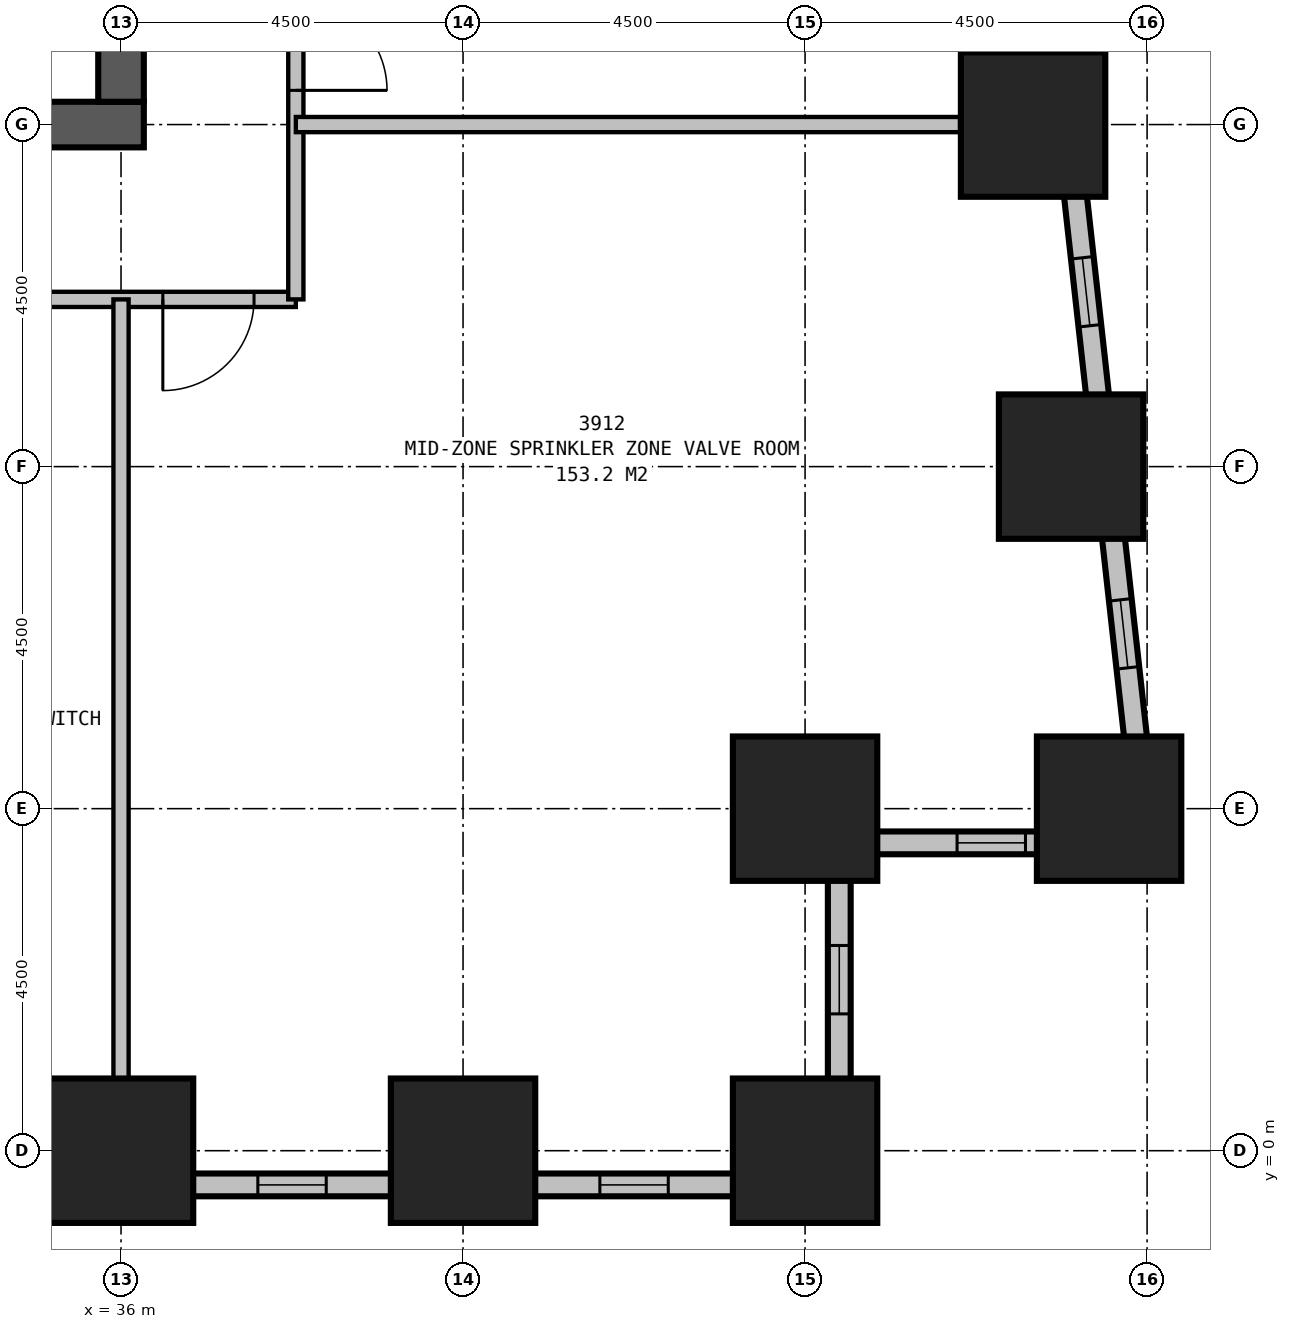
"""IFC4 building model, lengths in metres.
Left out: names, types, materials, properties, quantities, classifications, styles, units other than length and angle.
Written with IfcOpenShell. Run it as: python <this file> out.ifc"""

import sys

from ifc_helpers import new_model, si_unit, direction, frame, frame_2d, origin, origin_2d, place, context, subcontext, project, spatial, rectangle, extrude, element, fill, save


model = new_model("IFC4")
c1 = context("Model", 3, precision=1e-05, world=origin(), true_north=direction((0.0, 1.0)))
c2 = subcontext(c1, "Body", "Model", "MODEL_VIEW")
j1 = project(units=[si_unit("LENGTHUNIT", "METRE"), si_unit("PLANEANGLEUNIT", "RADIAN")], contexts=[c1])
p1 = place(None, origin())
s1 = spatial("IfcSite", under=j1, at=p1, CompositionType="ELEMENT")
p2 = place(p1, origin())
s2 = spatial("IfcBuilding", under=s1, at=p2, CompositionType="ELEMENT")
p3 = place(p2, frame((0.0, 0.0, 151.9)))
s3 = spatial("IfcBuildingStorey", under=s2, at=p3, CompositionType="ELEMENT", Elevation=151.9)
for number, where, z_axis, x_axis in (
    (1, (36.0, 0.0, 0.0), (0.0, 0.0, 1.0), (1.0, 0.0, 0.0)),
    (2, (40.5, 0.0, 0.0), (0.0, 0.0, 1.0), (1.0, 0.0, 0.0)),
    (3, (45.0, 0.0, 0.0), (0.0, 0.0, 1.0), (1.0, 0.0, 0.0)),
    (4, (45.0, 4.5, 0.0), (0.0, 0.0, 1.0), (1.0, 0.0, 0.0)),
    (5, (49.0, 4.5, 0.0), (0.0, 0.0, 1.0), (1.0, 0.0, 0.0)),
    (6, (48.5, 9.0, 0.0), (0.0, 0.0, 1.0), (1.0, 0.0, 0.0)),
    (7, (48.0, 13.5, 0.0), (0.0, 0.0, 1.0), (1.0, 0.0, 0.0)),
):
    element("IfcColumn", number, at=place(p3, frame(where, z_axis=z_axis, x_axis=x_axis)), inside=s3, PredefinedType="COLUMN", context=c2, shape_type="SweptSolid", body=[
        extrude(rectangle(XDim=1.9, YDim=1.9, at=origin_2d()), origin(), (0.0, 0.0, 1.0), 6.0),
    ])
p4 = place(p3, frame((13.2, 13.5, 0.0), z_axis=(0.0, 0.0, 1.0), x_axis=(1.0, 0.0, 0.0)))
e8 = element("IfcWall", 8, at=p4, inside=s3, PredefinedType="SHEAR", context=c2, shape_type="SweptSolid", body=[
    extrude(rectangle(XDim=23.1, YDim=0.6, at=frame_2d((11.55, 0.0))), origin(), (0.0, 0.0, 1.0), 6.0),
])
p5 = place(p3, frame((36.0, 13.8, 0.0), z_axis=(0.0, 0.0, 1.0), x_axis=(0.0, 1.0, 0.0)))
e9 = element("IfcWall", 9, at=p5, inside=s3, PredefinedType="SHEAR", context=c2, shape_type="SweptSolid", body=[
    extrude(rectangle(XDim=2.7, YDim=0.6, at=frame_2d((1.35, 0.0))), origin(), (0.0, 0.0, 1.0), 6.0),
])
p6 = place(p3, frame((3.9, -0.45, 0.0), z_axis=(0.0, 0.0, 1.0), x_axis=(1.0, 0.0, 0.0)))
e10 = element("IfcWall", 10, at=p6, inside=s3, PredefinedType="STANDARD", context=c2, shape_type="SweptSolid", body=[
    extrude(rectangle(XDim=41.7, YDim=0.3, at=frame_2d((20.85, 0.0))), origin(), (0.0, 0.0, 1.0), 3.35),
])
p7 = place(p6, frame((2.4, 0.0, 0.5)))
e11 = element("IfcOpeningElement", 11, at=p7, cuts=e10, PredefinedType="OPENING", context=c2, shape_type="SweptSolid", body=[
    extrude(rectangle(XDim=0.9, YDim=1.2, at=frame_2d((0.45, 0.6))), frame((0.0, 0.16, 0.0), z_axis=(0.0, -1.0, 0.0), x_axis=(1.0, 0.0, 0.0)), (0.0, 0.0, 1.0), 0.32),
])
p8 = place(p6, frame((6.9, 0.0, 0.5)))
e12 = element("IfcOpeningElement", 12, at=p8, cuts=e10, PredefinedType="OPENING", context=c2, shape_type="SweptSolid", body=[
    extrude(rectangle(XDim=0.9, YDim=1.2, at=frame_2d((0.45, 0.6))), frame((0.0, 0.16, 0.0), z_axis=(0.0, -1.0, 0.0), x_axis=(1.0, 0.0, 0.0)), (0.0, 0.0, 1.0), 0.32),
])
p9 = place(p6, frame((11.4, 0.0, 0.5)))
e13 = element("IfcOpeningElement", 13, at=p9, cuts=e10, PredefinedType="OPENING", context=c2, shape_type="SweptSolid", body=[
    extrude(rectangle(XDim=0.9, YDim=1.2, at=frame_2d((0.45, 0.6))), frame((0.0, 0.16, 0.0), z_axis=(0.0, -1.0, 0.0), x_axis=(1.0, 0.0, 0.0)), (0.0, 0.0, 1.0), 0.32),
])
p10 = place(p6, frame((15.9, 0.0, 0.5)))
e14 = element("IfcOpeningElement", 14, at=p10, cuts=e10, PredefinedType="OPENING", context=c2, shape_type="SweptSolid", body=[
    extrude(rectangle(XDim=0.9, YDim=1.2, at=frame_2d((0.45, 0.6))), frame((0.0, 0.16, 0.0), z_axis=(0.0, -1.0, 0.0), x_axis=(1.0, 0.0, 0.0)), (0.0, 0.0, 1.0), 0.32),
])
p11 = place(p6, frame((20.4, 0.0, 0.5)))
e15 = element("IfcOpeningElement", 15, at=p11, cuts=e10, PredefinedType="OPENING", context=c2, shape_type="SweptSolid", body=[
    extrude(rectangle(XDim=0.9, YDim=1.2, at=frame_2d((0.45, 0.6))), frame((0.0, 0.16, 0.0), z_axis=(0.0, -1.0, 0.0), x_axis=(1.0, 0.0, 0.0)), (0.0, 0.0, 1.0), 0.32),
])
p12 = place(p6, frame((24.9, 0.0, 0.5)))
e16 = element("IfcOpeningElement", 16, at=p12, cuts=e10, PredefinedType="OPENING", context=c2, shape_type="SweptSolid", body=[
    extrude(rectangle(XDim=0.9, YDim=1.2, at=frame_2d((0.45, 0.6))), frame((0.0, 0.16, 0.0), z_axis=(0.0, -1.0, 0.0), x_axis=(1.0, 0.0, 0.0)), (0.0, 0.0, 1.0), 0.32),
])
p13 = place(p6, frame((29.4, 0.0, 0.5)))
e17 = element("IfcOpeningElement", 17, at=p13, cuts=e10, PredefinedType="OPENING", context=c2, shape_type="SweptSolid", body=[
    extrude(rectangle(XDim=0.9, YDim=1.2, at=frame_2d((0.45, 0.6))), frame((0.0, 0.16, 0.0), z_axis=(0.0, -1.0, 0.0), x_axis=(1.0, 0.0, 0.0)), (0.0, 0.0, 1.0), 0.32),
])
p14 = place(p6, frame((33.9, 0.0, 0.5)))
e18 = element("IfcOpeningElement", 18, at=p14, cuts=e10, PredefinedType="OPENING", context=c2, shape_type="SweptSolid", body=[
    extrude(rectangle(XDim=0.9, YDim=1.2, at=frame_2d((0.45, 0.6))), frame((0.0, 0.16, 0.0), z_axis=(0.0, -1.0, 0.0), x_axis=(1.0, 0.0, 0.0)), (0.0, 0.0, 1.0), 0.32),
])
p15 = place(p6, frame((38.4, 0.0, 0.5)))
e19 = element("IfcOpeningElement", 19, at=p15, cuts=e10, PredefinedType="OPENING", context=c2, shape_type="SweptSolid", body=[
    extrude(rectangle(XDim=0.9, YDim=1.2, at=frame_2d((0.45, 0.6))), frame((0.0, 0.16, 0.0), z_axis=(0.0, -1.0, 0.0), x_axis=(1.0, 0.0, 0.0)), (0.0, 0.0, 1.0), 0.32),
])
p16 = place(p3, frame((45.45, -0.6, 0.0), z_axis=(0.0, 0.0, 1.0), x_axis=(0.0, 1.0, 0.0)))
e20 = element("IfcWall", 20, at=p16, inside=s3, PredefinedType="STANDARD", context=c2, shape_type="SweptSolid", body=[
    extrude(rectangle(XDim=4.8, YDim=0.3, at=frame_2d((2.4, 0.0))), origin(), (0.0, 0.0, 1.0), 3.35),
])
p17 = place(p16, frame((2.4, 0.0, 0.5)))
e21 = element("IfcOpeningElement", 21, at=p17, cuts=e20, PredefinedType="OPENING", context=c2, shape_type="SweptSolid", body=[
    extrude(rectangle(XDim=0.9, YDim=1.2, at=frame_2d((0.45, 0.6))), frame((0.0, 0.16, 0.0), z_axis=(0.0, -1.0, 0.0), x_axis=(1.0, 0.0, 0.0)), (0.0, 0.0, 1.0), 0.32),
])
p18 = place(p3, frame((45.3, 4.05, 0.0), z_axis=(0.0, 0.0, 1.0), x_axis=(1.0, 0.0, 0.0)))
e22 = element("IfcWall", 22, at=p18, inside=s3, PredefinedType="STANDARD", context=c2, shape_type="SweptSolid", body=[
    extrude(rectangle(XDim=4.353, YDim=0.3, at=frame_2d((2.176, 0.0))), origin(), (0.0, 0.0, 1.0), 3.35),
])
p19 = place(p18, frame((1.7, 0.0, 0.5)))
e23 = element("IfcOpeningElement", 23, at=p19, cuts=e22, PredefinedType="OPENING", context=c2, shape_type="SweptSolid", body=[
    extrude(rectangle(XDim=0.9, YDim=1.2, at=frame_2d((0.45, 0.6))), frame((0.0, 0.16, 0.0), z_axis=(0.0, -1.0, 0.0), x_axis=(1.0, 0.0, 0.0)), (0.0, 0.0, 1.0), 0.32),
])
p20 = place(p3, frame((49.519, 3.901, 0.0), z_axis=(0.0, 0.0, 1.0), x_axis=(-0.110429082637, 0.993884006164, 0.0)))
e24 = element("IfcWall", 24, at=p20, inside=s3, PredefinedType="STANDARD", context=c2, shape_type="SweptSolid", body=[
    extrude(rectangle(XDim=32.899, YDim=0.3, at=frame_2d((16.45, 0.0))), origin(), (0.0, 0.0, 1.0), 3.35),
])
p21 = place(p20, frame((2.467, 0.0, 0.5)))
e25 = element("IfcOpeningElement", 25, at=p21, cuts=e24, PredefinedType="OPENING", context=c2, shape_type="SweptSolid", body=[
    extrude(rectangle(XDim=0.9, YDim=1.2, at=frame_2d((0.45, 0.6))), frame((0.0, 0.16, 0.0), z_axis=(0.0, -1.0, 0.0), x_axis=(1.0, 0.0, 0.0)), (0.0, 0.0, 1.0), 0.32),
])
p22 = place(p20, frame((6.995, 0.0, 0.5)))
e26 = element("IfcOpeningElement", 26, at=p22, cuts=e24, PredefinedType="OPENING", context=c2, shape_type="SweptSolid", body=[
    extrude(rectangle(XDim=0.9, YDim=1.2, at=frame_2d((0.45, 0.6))), frame((0.0, 0.16, 0.0), z_axis=(0.0, -1.0, 0.0), x_axis=(1.0, 0.0, 0.0)), (0.0, 0.0, 1.0), 0.32),
])
p23 = place(p20, frame((11.522, 0.0, 0.5)))
e27 = element("IfcOpeningElement", 27, at=p23, cuts=e24, PredefinedType="OPENING", context=c2, shape_type="SweptSolid", body=[
    extrude(rectangle(XDim=0.9, YDim=1.2, at=frame_2d((0.45, 0.6))), frame((0.0, 0.16, 0.0), z_axis=(0.0, -1.0, 0.0), x_axis=(1.0, 0.0, 0.0)), (0.0, 0.0, 1.0), 0.32),
])
p24 = place(p20, frame((16.05, 0.0, 0.5)))
e28 = element("IfcOpeningElement", 28, at=p24, cuts=e24, PredefinedType="OPENING", context=c2, shape_type="SweptSolid", body=[
    extrude(rectangle(XDim=0.9, YDim=1.2, at=frame_2d((0.45, 0.6))), frame((0.0, 0.16, 0.0), z_axis=(0.0, -1.0, 0.0), x_axis=(1.0, 0.0, 0.0)), (0.0, 0.0, 1.0), 0.32),
])
p25 = place(p20, frame((20.578, 0.0, 0.5)))
e29 = element("IfcOpeningElement", 29, at=p25, cuts=e24, PredefinedType="OPENING", context=c2, shape_type="SweptSolid", body=[
    extrude(rectangle(XDim=0.9, YDim=1.2, at=frame_2d((0.45, 0.6))), frame((0.0, 0.16, 0.0), z_axis=(0.0, -1.0, 0.0), x_axis=(1.0, 0.0, 0.0)), (0.0, 0.0, 1.0), 0.32),
])
p26 = place(p20, frame((25.105, 0.0, 0.5)))
e30 = element("IfcOpeningElement", 30, at=p26, cuts=e24, PredefinedType="OPENING", context=c2, shape_type="SweptSolid", body=[
    extrude(rectangle(XDim=0.9, YDim=1.2, at=frame_2d((0.45, 0.6))), frame((0.0, 0.16, 0.0), z_axis=(0.0, -1.0, 0.0), x_axis=(1.0, 0.0, 0.0)), (0.0, 0.0, 1.0), 0.32),
])
p27 = place(p20, frame((29.633, 0.0, 0.5)))
e31 = element("IfcOpeningElement", 31, at=p27, cuts=e24, PredefinedType="OPENING", context=c2, shape_type="SweptSolid", body=[
    extrude(rectangle(XDim=0.9, YDim=1.2, at=frame_2d((0.45, 0.6))), frame((0.0, 0.16, 0.0), z_axis=(0.0, -1.0, 0.0), x_axis=(1.0, 0.0, 0.0)), (0.0, 0.0, 1.0), 0.32),
])
p28 = place(p3, frame((11.2, 11.2, 0.0), z_axis=(0.0, 0.0, 1.0), x_axis=(1.0, 0.0, 0.0)))
e32 = element("IfcWall", 32, at=p28, inside=s3, PredefinedType="PARTITIONING", context=c2, shape_type="SweptSolid", body=[
    extrude(rectangle(XDim=27.1, YDim=0.2, at=frame_2d((13.55, 0.0))), origin(), (0.0, 0.0, 1.0), 5.75),
])
p29 = place(p28, frame((4.0, 0.0, 0.0), z_axis=(0.0, 0.0, 1.0), x_axis=(-1.0, 0.0, 0.0)))
e33 = element("IfcOpeningElement", 33, at=p29, cuts=e32, PredefinedType="OPENING", context=c2, shape_type="SweptSolid", body=[
    extrude(rectangle(XDim=1.0, YDim=2.1, at=frame_2d((0.5, 1.05))), frame((0.0, 0.11, 0.0), z_axis=(0.0, -1.0, 0.0), x_axis=(1.0, 0.0, 0.0)), (0.0, 0.0, 1.0), 0.22),
])
p30 = place(p28, frame((6.1, 0.0, 0.0), z_axis=(0.0, 0.0, 1.0), x_axis=(-1.0, 0.0, 0.0)))
e34 = element("IfcOpeningElement", 34, at=p30, cuts=e32, PredefinedType="OPENING", context=c2, shape_type="SweptSolid", body=[
    extrude(rectangle(XDim=1.0, YDim=2.1, at=frame_2d((0.5, 1.05))), frame((0.0, 0.11, 0.0), z_axis=(0.0, -1.0, 0.0), x_axis=(1.0, 0.0, 0.0)), (0.0, 0.0, 1.0), 0.22),
])
p31 = place(p28, frame((9.05, 0.0, 0.0), z_axis=(0.0, 0.0, 1.0), x_axis=(-1.0, 0.0, 0.0)))
e35 = element("IfcOpeningElement", 35, at=p31, cuts=e32, PredefinedType="OPENING", context=c2, shape_type="SweptSolid", body=[
    extrude(rectangle(XDim=1.8, YDim=2.4, at=frame_2d((0.9, 1.2))), frame((0.0, 0.11, 0.0), z_axis=(0.0, -1.0, 0.0), x_axis=(1.0, 0.0, 0.0)), (0.0, 0.0, 1.0), 0.22),
])
p32 = place(p28, frame((21.75, 0.0, 0.0), z_axis=(0.0, 0.0, 1.0), x_axis=(-1.0, 0.0, 0.0)))
e36 = element("IfcOpeningElement", 36, at=p32, cuts=e32, PredefinedType="OPENING", context=c2, shape_type="SweptSolid", body=[
    extrude(rectangle(XDim=1.0, YDim=2.1, at=frame_2d((0.5, 1.05))), frame((0.0, 0.11, 0.0), z_axis=(0.0, -1.0, 0.0), x_axis=(1.0, 0.0, 0.0)), (0.0, 0.0, 1.0), 0.22),
])
p33 = place(p28, frame((1.75, 0.0, 0.0), z_axis=(0.0, 0.0, 1.0), x_axis=(-1.0, 0.0, 0.0)))
e37 = element("IfcOpeningElement", 37, at=p33, cuts=e32, PredefinedType="OPENING", context=c2, shape_type="SweptSolid", body=[
    extrude(rectangle(XDim=1.2, YDim=2.1, at=frame_2d((0.6, 1.05))), frame((0.0, 0.11, 0.0), z_axis=(0.0, -1.0, 0.0), x_axis=(1.0, 0.0, 0.0)), (0.0, 0.0, 1.0), 0.22),
])
p34 = place(p28, frame((26.55, 0.0, 0.0), z_axis=(0.0, 0.0, 1.0), x_axis=(-1.0, 0.0, 0.0)))
e38 = element("IfcOpeningElement", 38, at=p34, cuts=e32, PredefinedType="OPENING", context=c2, shape_type="SweptSolid", body=[
    extrude(rectangle(XDim=1.2, YDim=2.1, at=frame_2d((0.6, 1.05))), frame((0.0, 0.11, 0.0), z_axis=(0.0, -1.0, 0.0), x_axis=(1.0, 0.0, 0.0)), (0.0, 0.0, 1.0), 0.22),
])
p35 = place(p3, frame((38.3, 11.2, 0.0), z_axis=(0.0, 0.0, 1.0), x_axis=(0.0, 1.0, 0.0)))
e39 = element("IfcWall", 39, at=p35, inside=s3, PredefinedType="PARTITIONING", context=c2, shape_type="SweptSolid", body=[
    extrude(rectangle(XDim=18.1, YDim=0.2, at=frame_2d((9.05, 0.0))), origin(), (0.0, 0.0, 1.0), 5.75),
])
p36 = place(p35, frame((3.95, 0.0, 0.0), z_axis=(0.0, 0.0, 1.0), x_axis=(-1.0, 0.0, 0.0)))
e40 = element("IfcOpeningElement", 40, at=p36, cuts=e39, PredefinedType="OPENING", context=c2, shape_type="SweptSolid", body=[
    extrude(rectangle(XDim=1.2, YDim=2.1, at=frame_2d((0.6, 1.05))), frame((0.0, 0.11, 0.0), z_axis=(0.0, -1.0, 0.0), x_axis=(1.0, 0.0, 0.0)), (0.0, 0.0, 1.0), 0.22),
])
p37 = place(p3, frame((36.0, 11.2, 0.0), z_axis=(0.0, 0.0, 1.0), x_axis=(0.0, -1.0, 0.0)))
e41 = element("IfcWall", 41, at=p37, inside=s3, PredefinedType="PARTITIONING", context=c2, shape_type="SweptSolid", body=[
    extrude(rectangle(XDim=10.25, YDim=0.2, at=frame_2d((5.125, 0.0))), origin(), (0.0, 0.0, 1.0), 4.75),
])
p38 = place(p3, frame((38.3, 13.5, 0.0), z_axis=(0.0, 0.0, 1.0), x_axis=(1.0, 0.0, 0.0)))
e42 = element("IfcWall", 42, at=p38, inside=s3, PredefinedType="PARTITIONING", context=c2, shape_type="SweptSolid", body=[
    extrude(rectangle(XDim=8.739, YDim=0.2, at=frame_2d((4.37, 0.0))), origin(), (0.0, 0.0, 1.0), 4.45),
])
p39 = place(p14, origin())
e43 = element("IfcWindow", 43, at=p39, inside=s3, PartitioningType="SINGLE_PANEL", PredefinedType="USERDEFINED", context=c2, shape_type="SweptSolid", body=[
    extrude(rectangle(XDim=0.9, YDim=1.2, at=frame_2d((0.45, 0.6))), frame((0.0, 0.03, 0.0), z_axis=(0.0, -1.0, 0.0), x_axis=(1.0, 0.0, 0.0)), (0.0, 0.0, 1.0), 0.06),
])
fill(e18, e43)
p40 = place(p15, origin())
e44 = element("IfcWindow", 44, at=p40, inside=s3, PartitioningType="SINGLE_PANEL", PredefinedType="USERDEFINED", context=c2, shape_type="SweptSolid", body=[
    extrude(rectangle(XDim=0.9, YDim=1.2, at=frame_2d((0.45, 0.6))), frame((0.0, 0.03, 0.0), z_axis=(0.0, -1.0, 0.0), x_axis=(1.0, 0.0, 0.0)), (0.0, 0.0, 1.0), 0.06),
])
fill(e19, e44)
p41 = place(p17, origin())
e45 = element("IfcWindow", 45, at=p41, inside=s3, PartitioningType="SINGLE_PANEL", PredefinedType="USERDEFINED", context=c2, shape_type="SweptSolid", body=[
    extrude(rectangle(XDim=0.9, YDim=1.2, at=frame_2d((0.45, 0.6))), frame((0.0, 0.03, 0.0), z_axis=(0.0, -1.0, 0.0), x_axis=(1.0, 0.0, 0.0)), (0.0, 0.0, 1.0), 0.06),
])
fill(e21, e45)
p42 = place(p19, origin())
e46 = element("IfcWindow", 46, at=p42, inside=s3, PartitioningType="SINGLE_PANEL", PredefinedType="USERDEFINED", context=c2, shape_type="SweptSolid", body=[
    extrude(rectangle(XDim=0.9, YDim=1.2, at=frame_2d((0.45, 0.6))), frame((0.0, 0.03, 0.0), z_axis=(0.0, -1.0, 0.0), x_axis=(1.0, 0.0, 0.0)), (0.0, 0.0, 1.0), 0.06),
])
fill(e23, e46)
p43 = place(p21, origin())
e47 = element("IfcWindow", 47, at=p43, inside=s3, PartitioningType="SINGLE_PANEL", PredefinedType="USERDEFINED", context=c2, shape_type="SweptSolid", body=[
    extrude(rectangle(XDim=0.9, YDim=1.2, at=frame_2d((0.45, 0.6))), frame((0.0, 0.03, 0.0), z_axis=(0.0, -1.0, 0.0), x_axis=(1.0, 0.0, 0.0)), (0.0, 0.0, 1.0), 0.06),
])
fill(e25, e47)
p44 = place(p22, origin())
e48 = element("IfcWindow", 48, at=p44, inside=s3, PartitioningType="SINGLE_PANEL", PredefinedType="USERDEFINED", context=c2, shape_type="SweptSolid", body=[
    extrude(rectangle(XDim=0.9, YDim=1.2, at=frame_2d((0.45, 0.6))), frame((0.0, 0.03, 0.0), z_axis=(0.0, -1.0, 0.0), x_axis=(1.0, 0.0, 0.0)), (0.0, 0.0, 1.0), 0.06),
])
fill(e26, e48)
p45 = place(p34, origin())
e49 = element("IfcDoor", 49, at=p45, inside=s3, OperationType="SINGLE_SWING_RIGHT", PredefinedType="DOOR", context=c2, shape_type="SweptSolid", body=[
    extrude(rectangle(XDim=1.2, YDim=2.1, at=frame_2d((0.6, 1.05))), frame((0.0, 0.025, 0.0), z_axis=(0.0, -1.0, 0.0), x_axis=(1.0, 0.0, 0.0)), (0.0, 0.0, 1.0), 0.05),
])
fill(e38, e49)
p46 = place(p36, origin())
e50 = element("IfcDoor", 50, at=p46, inside=s3, OperationType="SINGLE_SWING_RIGHT", PredefinedType="DOOR", context=c2, shape_type="SweptSolid", body=[
    extrude(rectangle(XDim=1.2, YDim=2.1, at=frame_2d((0.6, 1.05))), frame((0.0, 0.025, 0.0), z_axis=(0.0, -1.0, 0.0), x_axis=(1.0, 0.0, 0.0)), (0.0, 0.0, 1.0), 0.05),
])
fill(e40, e50)
save(model, sys.argv[1])
